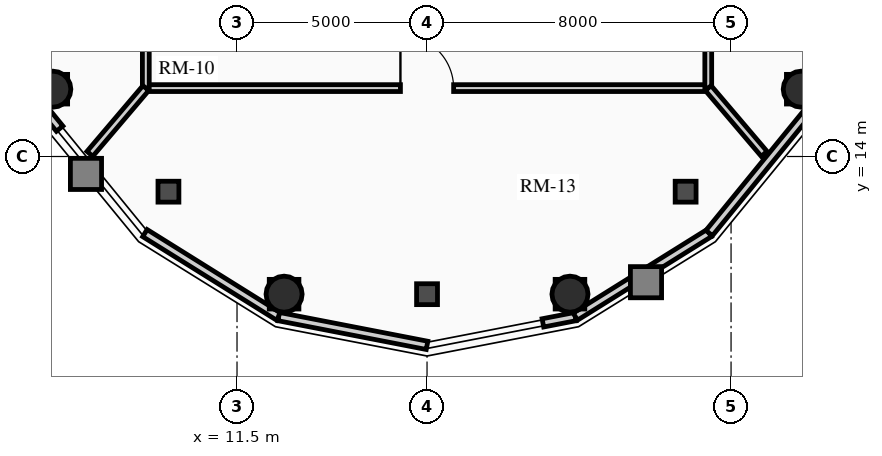
"""IFC4 building model, lengths in metres.
Left out: names, types, materials, properties, quantities, classifications, styles, units other than length and angle.
Written with IfcOpenShell. Run it as: python <this file> out.ifc"""

import sys

from ifc_helpers import new_model, si_unit, direction, frame, frame_2d, origin, origin_2d, place, context, subcontext, project, spatial, rectangle, circle, extrude, source, transform, mapped, element, fill, save


model = new_model("IFC4")
c1 = context("Model", 3, precision=1e-05, world=origin(), true_north=direction((0.0, 1.0)))
c2 = subcontext(c1, "Body", "Model", "MODEL_VIEW")
j1 = project(units=[si_unit("LENGTHUNIT", "METRE"), si_unit("PLANEANGLEUNIT", "RADIAN")], contexts=[c1])
p1 = place(None, origin())
s1 = spatial("IfcSite", under=j1, at=p1, CompositionType="ELEMENT")
p2 = place(p1, origin())
s2 = spatial("IfcBuilding", under=s1, at=p2, CompositionType="ELEMENT")
p3 = place(p2, frame((0.0, 0.0, 235.65)))
s3 = spatial("IfcBuildingStorey", under=s2, at=p3, CompositionType="ELEMENT", Elevation=235.65)
for number, where, z_axis, x_axis in (
    (1, (6.653, 15.771, 0.0), (0.0, 0.0, 1.0), (1.0, 0.0, 0.0)),
    (2, (12.739, 10.377, 0.0), (0.0, 0.0, 1.0), (1.0, 0.0, 0.0)),
    (3, (20.261, 10.377, 0.0), (0.0, 0.0, 1.0), (1.0, 0.0, 0.0)),
    (4, (26.347, 15.771, 0.0), (0.0, 0.0, 1.0), (1.0, 0.0, 0.0)),
):
    element("IfcColumn", number, at=place(p3, frame(where, z_axis=z_axis, x_axis=x_axis)), inside=s3, PredefinedType="COLUMN", context=c2, shape_type="SweptSolid", body=[
        extrude(circle(Radius=0.475, at=origin_2d()), origin(), (0.0, 0.0, 1.0), 4.68),
    ])
p4 = place(p3, frame((6.832, 14.733, 0.0), z_axis=(0.0, 0.0, 1.0), x_axis=(-0.632534570862, 0.774532127587, 0.0)))
e5 = element("IfcWall", 5, at=p4, inside=s3, PredefinedType="SOLIDWALL", context=c2, shape_type="SweptSolid", body=[
    extrude(rectangle(XDim=0.87, YDim=0.22, at=frame_2d((0.435, 0.0))), origin(), (0.0, 0.0, 1.0), 3.696),
])
p5 = place(p3, frame((12.597, 9.787, 0.0), z_axis=(0.0, 0.0, 1.0), x_axis=(-0.848318713376, 0.529485939886, 0.0)))
e6 = element("IfcWall", 6, at=p5, inside=s3, PredefinedType="SOLIDWALL", context=c2, shape_type="SweptSolid", body=[
    extrude(rectangle(XDim=4.15, YDim=0.22, at=frame_2d((2.075, 0.0))), origin(), (0.0, 0.0, 1.0), 3.696),
])
p6 = place(p3, frame((16.5, 9.03, 0.0), z_axis=(0.0, 0.0, 1.0), x_axis=(-0.981700307484, 0.190432419211, 0.0)))
e7 = element("IfcWall", 7, at=p6, inside=s3, PredefinedType="SOLIDWALL", context=c2, shape_type="SweptSolid", body=[
    extrude(rectangle(XDim=3.976, YDim=0.22, at=frame_2d((1.988, 0.0))), origin(), (0.0, 0.0, 1.0), 3.696),
])
p7 = place(p3, frame((20.403, 9.787, 0.0), z_axis=(0.0, 0.0, 1.0), x_axis=(-0.981729145882, -0.190283693799, 0.0)))
e8 = element("IfcWall", 8, at=p7, inside=s3, PredefinedType="SOLIDWALL", context=c2, shape_type="SweptSolid", body=[
    extrude(rectangle(XDim=0.87, YDim=0.22, at=frame_2d((0.435, 0.0))), origin(), (0.0, 0.0, 1.0), 3.696),
])
p8 = place(p3, frame((23.924, 11.985, 0.0), z_axis=(0.0, 0.0, 1.0), x_axis=(-0.848318713376, -0.529485939886, 0.0)))
e9 = element("IfcWall", 9, at=p8, inside=s3, PredefinedType="SOLIDWALL", context=c2, shape_type="SweptSolid", body=[
    extrude(rectangle(XDim=4.15, YDim=0.22, at=frame_2d((2.075, 0.0))), origin(), (0.0, 0.0, 1.0), 3.696),
])
p9 = place(p3, frame((26.718, 15.407, 0.0), z_axis=(0.0, 0.0, 1.0), x_axis=(-0.632467166636, -0.774587169483, 0.0)))
e10 = element("IfcWall", 10, at=p9, inside=s3, PredefinedType="SOLIDWALL", context=c2, shape_type="SweptSolid", body=[
    extrude(rectangle(XDim=4.418, YDim=0.22, at=frame_2d((2.209, 0.0))), origin(), (0.0, 0.0, 1.0), 3.696),
])
p10 = place(p3, frame((9.1, 15.8, 0.0), z_axis=(0.0, 0.0, 1.0), x_axis=(1.0, 0.0, 0.0)))
e11 = element("IfcWall", 11, at=p10, inside=s3, PredefinedType="PARTITIONING", context=c2, shape_type="SweptSolid", body=[
    extrude(rectangle(XDim=14.8, YDim=0.18, at=frame_2d((7.4, 0.0))), origin(), (0.0, 0.0, 1.0), 3.616),
])
m1 = source(origin(), c2, "Body", "SweptSolid", [
    extrude(rectangle(XDim=1.4, YDim=2.02, at=frame_2d((0.7, 1.01))), frame((0.0, 0.1, 0.0), z_axis=(0.0, -1.0, 0.0), x_axis=(1.0, 0.0, 0.0)), (0.0, 0.0, 1.0), 0.2),
])
p11 = place(p10, frame((6.7, 0.0, 0.0)))
e12 = element("IfcOpeningElement", 12, at=p11, cuts=e11, PredefinedType="OPENING", context=c2, shape_type="MappedRepresentation", body=[
    mapped(m1, transform((0.0, 0.0, 0.0), x_axis=(1.0, 0.0, 0.0), y_axis=(0.0, 1.0, 0.0), z_axis=(0.0, 0.0, 1.0), scale=1.0)),
])
p12 = place(p3, frame((9.1, 15.8, 0.0), z_axis=(0.0, 0.0, 1.0), x_axis=(0.0, 1.0, 0.0)))
e13 = element("IfcWall", 13, at=p12, inside=s3, PredefinedType="PARTITIONING", context=c2, shape_type="SweptSolid", body=[
    extrude(rectangle(XDim=15.55, YDim=0.18, at=frame_2d((7.775, 0.0))), origin(), (0.0, 0.0, 1.0), 3.616),
])
p13 = place(p12, frame((7.075, 0.0, 0.0)))
e14 = element("IfcOpeningElement", 14, at=p13, cuts=e13, PredefinedType="OPENING", context=c2, shape_type="MappedRepresentation", body=[
    mapped(m1, transform((0.0, 0.0, 0.0), x_axis=(1.0, 0.0, 0.0), y_axis=(0.0, 1.0, 0.0), z_axis=(0.0, 0.0, 1.0), scale=1.0)),
])
p14 = place(p3, frame((23.9, 15.8, 0.0), z_axis=(0.0, 0.0, 1.0), x_axis=(0.0, 1.0, 0.0)))
e15 = element("IfcWall", 15, at=p14, inside=s3, PredefinedType="PARTITIONING", context=c2, shape_type="SweptSolid", body=[
    extrude(rectangle(XDim=15.55, YDim=0.18, at=frame_2d((7.775, 0.0))), origin(), (0.0, 0.0, 1.0), 2.892),
])
p15 = place(p14, frame((7.075, 0.0, 0.0)))
e16 = element("IfcOpeningElement", 16, at=p15, cuts=e15, PredefinedType="OPENING", context=c2, shape_type="MappedRepresentation", body=[
    mapped(m1, transform((0.0, 0.0, 0.0), x_axis=(1.0, 0.0, 0.0), y_axis=(0.0, 1.0, 0.0), z_axis=(0.0, 0.0, 1.0), scale=1.0)),
])
for number, where, z_axis, x_axis in (
    (17, (23.9, 15.8, 0.0), (0.0, 0.0, 1.0), (0.648, -0.762, 0.0)),
    (18, (9.1, 15.8, 0.0), (0.0, 0.0, 1.0), (-0.648, -0.762, 0.0)),
):
    element("IfcWall", number, at=place(p3, frame(where, z_axis=z_axis, x_axis=x_axis)), inside=s3, PredefinedType="PARTITIONING", context=c2, shape_type="SweptSolid", body=[
        extrude(rectangle(XDim=2.272, YDim=0.2, at=frame_2d((1.136, 0.0))), origin(), (0.0, 0.0, 1.0), 3.696),
    ])
m2 = source(origin(), c2, "Body", "SweptSolid", [
    extrude(rectangle(XDim=1.4, YDim=2.02, at=frame_2d((0.7, 1.01))), frame((0.0, 0.025, 0.0), z_axis=(0.0, -1.0, 0.0), x_axis=(1.0, 0.0, 0.0)), (0.0, 0.0, 1.0), 0.05),
])
p16 = place(p11, origin())
e19 = element("IfcDoor", 19, at=p16, inside=s3, OperationType="SINGLE_SWING_LEFT", PredefinedType="DOOR", context=c2, shape_type="MappedRepresentation", body=[
    mapped(m2, transform((0.0, 0.0, 0.0), x_axis=(1.0, 0.0, 0.0), y_axis=(0.0, 1.0, 0.0), z_axis=(0.0, 0.0, 1.0), scale=1.0)),
])
fill(e12, e19)
save(model, sys.argv[1])
